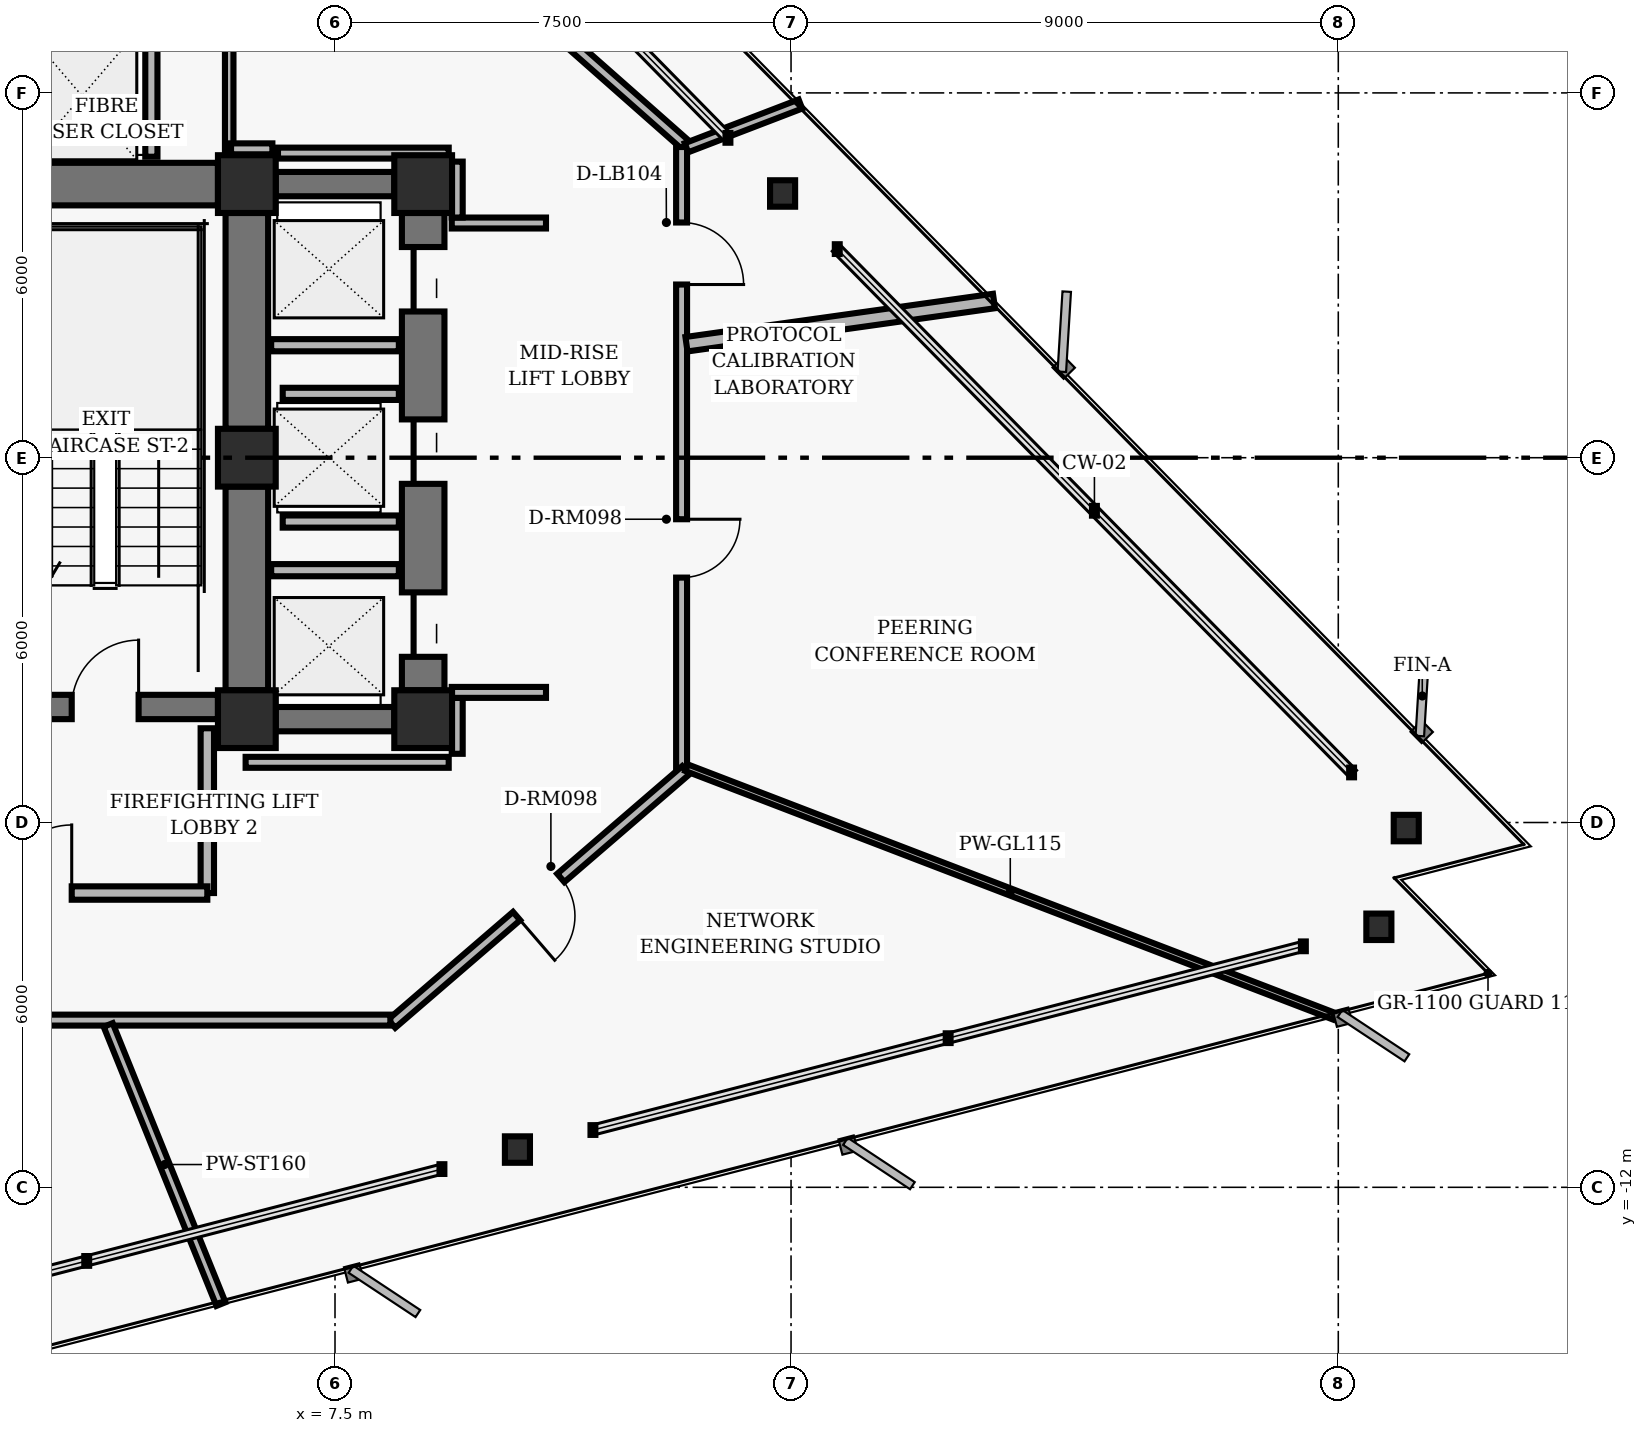
"""IFC4 building model, lengths in metres.
Left out: names, types, materials, properties, quantities, classifications, styles, units other than length and angle.
Written with IfcOpenShell. Run it as: python <this file> out.ifc"""

import sys

from ifc_helpers import new_model, si_unit, direction, frame, frame_2d, origin, origin_2d, place, context, subcontext, project, spatial, rectangle, hollow_rectangle, i_section, extrude, element, fill, save


model = new_model("IFC4")
c1 = context("Model", 3, precision=1e-05, world=origin(), true_north=direction((0.0, 1.0)))
c2 = subcontext(c1, "Body", "Model", "MODEL_VIEW")
j1 = project(units=[si_unit("LENGTHUNIT", "METRE"), si_unit("PLANEANGLEUNIT", "RADIAN")], contexts=[c1])
p1 = place(None, origin())
s1 = spatial("IfcSite", under=j1, at=p1, CompositionType="ELEMENT")
p2 = place(p1, origin())
s2 = spatial("IfcBuilding", under=s1, at=p2, CompositionType="ELEMENT")
p3 = place(p2, frame((0.0, 0.0, 97.76)))
s3 = spatial("IfcBuildingStorey", under=s2, at=p3, CompositionType="ELEMENT", Elevation=97.76)
for number, where, z_axis, x_axis in (
    (1, (6.05, 4.5, 0.0), (0.0, 0.0, 1.0), (1.0, 0.0, 0.0)),
    (2, (6.05, 0.0, 0.0), (0.0, 0.0, 1.0), (1.0, 0.0, 0.0)),
    (3, (6.05, -4.3, 0.0), (0.0, 0.0, 1.0), (1.0, 0.0, 0.0)),
    (4, (8.95, 4.5, 0.0), (0.0, 0.0, 1.0), (1.0, 0.0, 0.0)),
    (5, (8.95, -4.3, 0.0), (0.0, 0.0, 1.0), (1.0, 0.0, 0.0)),
):
    element("IfcColumn", number, at=place(p3, frame(where, z_axis=z_axis, x_axis=x_axis)), inside=s3, PredefinedType="COLUMN", context=c2, shape_type="SweptSolid", body=[
        extrude(hollow_rectangle(XDim=0.95, YDim=0.95, WallThickness=0.06, InnerFilletRadius=0.02, OuterFilletRadius=0.04, at=origin_2d()), origin(), (0.0, 0.0, 1.0), 3.04),
    ])
p4 = place(p3, frame((6.05, 0.475, 0.0), z_axis=(0.0, 0.0, 1.0), x_axis=(0.0, 1.0, 0.0)))
e6 = element("IfcWall", 6, at=p4, inside=s3, PredefinedType="SHEAR", context=c2, shape_type="SweptSolid", body=[
    extrude(rectangle(XDim=3.55, YDim=0.7, at=frame_2d((1.775, 0.0))), origin(), (0.0, 0.0, 1.0), 2.718),
])
p5 = place(p3, frame((6.05, -3.825, 0.0), z_axis=(0.0, 0.0, 1.0), x_axis=(0.0, 1.0, 0.0)))
e7 = element("IfcWall", 7, at=p5, inside=s3, PredefinedType="SHEAR", context=c2, shape_type="SweptSolid", body=[
    extrude(rectangle(XDim=3.35, YDim=0.7, at=frame_2d((1.675, 0.0))), origin(), (0.0, 0.0, 1.0), 2.718),
])
p6 = place(p3, frame((-5.575, -4.1, 0.0), z_axis=(0.0, 0.0, 1.0), x_axis=(1.0, 0.0, 0.0)))
e8 = element("IfcWall", 8, at=p6, inside=s3, PredefinedType="SHEAR", context=c2, shape_type="SweptSolid", body=[
    extrude(rectangle(XDim=11.15, YDim=0.4, at=frame_2d((5.575, 0.0))), origin(), (0.0, 0.0, 1.0), 2.718),
])
p7 = place(p6, frame((1.305, 0.0, 0.0)))
e9 = element("IfcOpeningElement", 9, at=p7, cuts=e8, PredefinedType="OPENING", context=c2, shape_type="SweptSolid", body=[
    extrude(rectangle(XDim=1.1, YDim=2.04, at=frame_2d((0.55, 1.02))), frame((0.0, 0.21, 0.0), z_axis=(0.0, -1.0, 0.0), x_axis=(1.0, 0.0, 0.0)), (0.0, 0.0, 1.0), 0.42),
])
p8 = place(p6, frame((8.745, 0.0, 0.0)))
e10 = element("IfcOpeningElement", 10, at=p8, cuts=e8, PredefinedType="OPENING", context=c2, shape_type="SweptSolid", body=[
    extrude(rectangle(XDim=1.1, YDim=2.04, at=frame_2d((0.55, 1.02))), frame((0.0, 0.21, 0.0), z_axis=(0.0, -1.0, 0.0), x_axis=(1.0, 0.0, 0.0)), (0.0, 0.0, 1.0), 0.42),
])
p9 = place(p6, frame((4.045, 0.0, 0.0)))
e11 = element("IfcOpeningElement", 11, at=p9, cuts=e8, PredefinedType="OPENING", context=c2, shape_type="SweptSolid", body=[
    extrude(rectangle(XDim=1.06, YDim=2.04, at=frame_2d((0.53, 1.02))), frame((0.0, 0.21, 0.0), z_axis=(0.0, -1.0, 0.0), x_axis=(1.0, 0.0, 0.0)), (0.0, 0.0, 1.0), 0.42),
])
p10 = place(p6, frame((6.045, 0.0, 0.0)))
e12 = element("IfcOpeningElement", 12, at=p10, cuts=e8, PredefinedType="OPENING", context=c2, shape_type="SweptSolid", body=[
    extrude(rectangle(XDim=1.06, YDim=2.04, at=frame_2d((0.53, 1.02))), frame((0.0, 0.21, 0.0), z_axis=(0.0, -1.0, 0.0), x_axis=(1.0, 0.0, 0.0)), (0.0, 0.0, 1.0), 0.42),
])
p11 = place(p3, frame((2.05, 4.5, 0.0), z_axis=(0.0, 0.0, 1.0), x_axis=(1.0, 0.0, 0.0)))
e13 = element("IfcWall", 13, at=p11, inside=s3, PredefinedType="SHEAR", context=c2, shape_type="SweptSolid", body=[
    extrude(rectangle(XDim=3.525, YDim=0.7, at=frame_2d((1.762, 0.0))), origin(), (0.0, 0.0, 1.0), 2.718),
])
p12 = place(p3, frame((8.95, -3.825, 0.0), z_axis=(0.0, 0.0, 1.0), x_axis=(0.0, 1.0, 0.0)))
e14 = element("IfcWall", 14, at=p12, inside=s3, PredefinedType="SHEAR", context=c2, shape_type="SweptSolid", body=[
    extrude(rectangle(XDim=7.85, YDim=0.7, at=frame_2d((3.925, 0.0))), origin(), (0.0, 0.0, 1.0), 2.718),
])
p13 = place(p12, frame((0.55, 0.0, 0.0)))
e15 = element("IfcOpeningElement", 15, at=p13, cuts=e14, PredefinedType="OPENING", context=c2, shape_type="SweptSolid", body=[
    extrude(rectangle(XDim=1.06, YDim=2.04, at=frame_2d((0.53, 1.02))), frame((0.0, 0.36, 0.0), z_axis=(0.0, -1.0, 0.0), x_axis=(1.0, 0.0, 0.0)), (0.0, 0.0, 1.0), 0.72),
])
p14 = place(p12, frame((3.395, 0.0, 0.0)))
e16 = element("IfcOpeningElement", 16, at=p14, cuts=e14, PredefinedType="OPENING", context=c2, shape_type="SweptSolid", body=[
    extrude(rectangle(XDim=1.06, YDim=2.04, at=frame_2d((0.53, 1.02))), frame((0.0, 0.36, 0.0), z_axis=(0.0, -1.0, 0.0), x_axis=(1.0, 0.0, 0.0)), (0.0, 0.0, 1.0), 0.72),
])
p15 = place(p12, frame((6.23, 0.0, 0.0)))
e17 = element("IfcOpeningElement", 17, at=p15, cuts=e14, PredefinedType="OPENING", context=c2, shape_type="SweptSolid", body=[
    extrude(rectangle(XDim=1.06, YDim=2.04, at=frame_2d((0.53, 1.02))), frame((0.0, 0.36, 0.0), z_axis=(0.0, -1.0, 0.0), x_axis=(1.0, 0.0, 0.0)), (0.0, 0.0, 1.0), 0.72),
])
for number, where, z_axis, x_axis in (
    (18, (6.525, 4.5, 0.0), (0.0, 0.0, 1.0), (1.0, 0.0, 0.0)),
    (19, (6.525, -4.3, 0.0), (0.0, 0.0, 1.0), (1.0, 0.0, 0.0)),
):
    element("IfcWall", number, at=place(p3, frame(where, z_axis=z_axis, x_axis=x_axis)), inside=s3, PredefinedType="SHEAR", context=c2, shape_type="SweptSolid", body=[
        extrude(rectangle(XDim=1.95, YDim=0.4, at=frame_2d((0.975, 0.0))), origin(), (0.0, 0.0, 1.0), 2.718),
    ])
for number, where, z_axis, x_axis in (
    (20, (25.118, -6.092, 0.0), (0.0, 0.0, 1.0), (1.0, 0.0, 0.0)),
    (21, (14.861, 4.346, 0.0), (0.0, 0.0, 1.0), (1.0, 0.0, 0.0)),
    (22, (10.5, -11.379, 0.0), (0.0, 0.0, 1.0), (1.0, 0.0, 0.0)),
    (23, (24.667, -7.715, 0.0), (0.0, 0.0, 1.0), (1.0, 0.0, 0.0)),
):
    element("IfcColumn", number, at=place(p3, frame(where, z_axis=z_axis, x_axis=x_axis)), inside=s3, PredefinedType="COLUMN", context=c2, shape_type="SweptSolid", body=[
        extrude(i_section(OverallWidth=0.412, OverallDepth=0.435, WebThickness=0.036, FlangeThickness=0.057, FilletRadius=0.022, at=origin_2d()), origin(), (0.0, 0.0, 1.0), 3.04),
    ])
p16 = place(p3, frame((5.4, -7.16, 0.0), z_axis=(0.0, 0.0, 1.0), x_axis=(0.0, 1.0, 0.0)))
e24 = element("IfcWall", 24, at=p16, inside=s3, PredefinedType="PARTITIONING", context=c2, shape_type="SweptSolid", body=[
    extrude(rectangle(XDim=2.71, YDim=0.22, at=frame_2d((1.355, 0.0))), origin(), (0.0, 0.0, 1.0), 2.693),
])
p17 = place(p3, frame((0.0, -7.16, 0.0), z_axis=(0.0, 0.0, 1.0), x_axis=(1.0, 0.0, 0.0)))
e25 = element("IfcWall", 25, at=p17, inside=s3, PredefinedType="PARTITIONING", context=c2, shape_type="SweptSolid", body=[
    extrude(rectangle(XDim=5.4, YDim=0.22, at=frame_2d((2.7, 0.0))), origin(), (0.0, 0.0, 1.0), 2.693),
])
p18 = place(p17, frame((2.05, 0.0, 0.0)))
e26 = element("IfcOpeningElement", 26, at=p18, cuts=e25, PredefinedType="OPENING", context=c2, shape_type="SweptSolid", body=[
    extrude(rectangle(XDim=1.12, YDim=2.02, at=frame_2d((0.56, 1.01))), frame((0.0, 0.12, 0.0), z_axis=(0.0, -1.0, 0.0), x_axis=(1.0, 0.0, 0.0)), (0.0, 0.0, 1.0), 0.24),
])
p19 = place(p3, frame((4.48, 4.95, 0.0), z_axis=(0.0, 0.0, 1.0), x_axis=(0.0, 1.0, 0.0)))
e27 = element("IfcWall", 27, at=p19, inside=s3, PredefinedType="PARTITIONING", context=c2, shape_type="SweptSolid", body=[
    extrude(rectangle(XDim=2.1, YDim=0.2, at=frame_2d((1.05, 0.0))), origin(), (0.0, 0.0, 1.0), 2.693),
])
p20 = place(p3, frame((5.76, 4.95, 0.0), z_axis=(0.0, 0.0, 1.0), x_axis=(0.0, 1.0, 0.0)))
e28 = element("IfcWall", 28, at=p20, inside=s3, PredefinedType="PARTITIONING", context=c2, shape_type="SweptSolid", body=[
    extrude(rectangle(XDim=2.1, YDim=0.14, at=frame_2d((1.05, 0.0))), origin(), (0.0, 0.0, 1.0), 2.693),
])
for number, where, z_axis, x_axis in (
    (29, (6.45, -1.85, 0.0), (0.0, 0.0, 1.0), (1.0, 0.0, 0.0)),
    (30, (6.45, 1.85, 0.0), (0.0, 0.0, 1.0), (1.0, 0.0, 0.0)),
):
    element("IfcWall", number, at=place(p3, frame(where, z_axis=z_axis, x_axis=x_axis)), inside=s3, PredefinedType="PARTITIONING", context=c2, shape_type="SweptSolid", body=[
        extrude(rectangle(XDim=2.1, YDim=0.2, at=frame_2d((1.05, 0.0))), origin(), (0.0, 0.0, 1.0), 2.693),
    ])
for number, where, z_axis, x_axis in (
    (31, (6.64, -1.05, 0.0), (0.0, 0.0, 1.0), (1.0, 0.0, 0.0)),
    (32, (6.64, 1.05, 0.0), (0.0, 0.0, 1.0), (1.0, 0.0, 0.0)),
):
    element("IfcWall", number, at=place(p3, frame(where, z_axis=z_axis, x_axis=x_axis)), inside=s3, PredefinedType="PARTITIONING", context=c2, shape_type="SweptSolid", body=[
        extrude(rectangle(XDim=1.91, YDim=0.2, at=frame_2d((0.955, 0.0))), origin(), (0.0, 0.0, 1.0), 2.693),
    ])
p21 = place(p3, frame((8.567, 9.29, 0.0), z_axis=(0.0, 0.0, 1.0), x_axis=(0.749626463267, -0.66186113768, 0.0)))
e33 = element("IfcWall", 33, at=p21, inside=s3, PredefinedType="PARTITIONING", context=c2, shape_type="SweptSolid", body=[
    extrude(rectangle(XDim=6.27, YDim=0.18, at=frame_2d((3.135, 0.0))), origin(), (0.0, 0.0, 1.0), 2.207),
])
p22 = place(p3, frame((13.2, 5.11, 0.0), z_axis=(0.0, 0.0, 1.0), x_axis=(0.0, -1.0, 0.0)))
e34 = element("IfcWall", 34, at=p22, inside=s3, PredefinedType="PARTITIONING", context=c2, shape_type="SweptSolid", body=[
    extrude(rectangle(XDim=10.22, YDim=0.18, at=frame_2d((5.11, 0.0))), origin(), (0.0, 0.0, 1.0), 2.207),
])
p23 = place(p22, frame((6.122, 0.0, 0.0)))
e35 = element("IfcOpeningElement", 35, at=p23, cuts=e34, PredefinedType="OPENING", context=c2, shape_type="SweptSolid", body=[
    extrude(rectangle(XDim=0.96, YDim=2.02, at=frame_2d((0.48, 1.01))), frame((0.0, 0.1, 0.0), z_axis=(0.0, -1.0, 0.0), x_axis=(1.0, 0.0, 0.0)), (0.0, 0.0, 1.0), 0.2),
])
p24 = place(p22, frame((1.242, 0.0, 0.0)))
e36 = element("IfcOpeningElement", 36, at=p24, cuts=e34, PredefinedType="OPENING", context=c2, shape_type="SweptSolid", body=[
    extrude(rectangle(XDim=1.02, YDim=2.02, at=frame_2d((0.51, 1.01))), frame((0.0, 0.1, 0.0), z_axis=(0.0, -1.0, 0.0), x_axis=(1.0, 0.0, 0.0)), (0.0, 0.0, 1.0), 0.2),
])
p25 = place(p3, frame((13.268, -5.141, 0.0), z_axis=(0.0, 0.0, 1.0), x_axis=(-0.757534501725, -0.65279512766, 0.0)))
e37 = element("IfcWall", 37, at=p25, inside=s3, PredefinedType="PARTITIONING", context=c2, shape_type="SweptSolid", body=[
    extrude(rectangle(XDim=6.385, YDim=0.18, at=frame_2d((3.192, 0.0))), origin(), (0.0, 0.0, 1.0), 2.693),
])
p26 = place(p25, frame((2.712, 0.0, 0.0)))
e38 = element("IfcOpeningElement", 38, at=p26, cuts=e37, PredefinedType="OPENING", context=c2, shape_type="SweptSolid", body=[
    extrude(rectangle(XDim=0.96, YDim=2.02, at=frame_2d((0.48, 1.01))), frame((0.0, 0.1, 0.0), z_axis=(0.0, -1.0, 0.0), x_axis=(1.0, 0.0, 0.0)), (0.0, 0.0, 1.0), 0.2),
])
p27 = place(p3, frame((8.41, -9.25, 0.0), z_axis=(0.0, 0.0, 1.0), x_axis=(-1.0, 0.0, 0.0)))
e39 = element("IfcWall", 39, at=p27, inside=s3, PredefinedType="PARTITIONING", context=c2, shape_type="SweptSolid", body=[
    extrude(rectangle(XDim=17.0, YDim=0.18, at=frame_2d((8.5, 0.0))), origin(), (0.0, 0.0, 1.0), 2.207),
])
p28 = place(p27, frame((10.181, 0.0, 0.0)))
e40 = element("IfcOpeningElement", 40, at=p28, cuts=e39, PredefinedType="OPENING", context=c2, shape_type="SweptSolid", body=[
    extrude(rectangle(XDim=1.02, YDim=2.02, at=frame_2d((0.51, 1.01))), frame((0.0, 0.1, 0.0), z_axis=(0.0, -1.0, 0.0), x_axis=(1.0, 0.0, 0.0)), (0.0, 0.0, 1.0), 0.2),
])
p29 = place(p3, frame((6.03, -5.01, 0.0), z_axis=(0.0, 0.0, 1.0), x_axis=(1.0, 0.0, 0.0)))
e41 = element("IfcWall", 41, at=p29, inside=s3, PredefinedType="PARTITIONING", context=c2, shape_type="SweptSolid", body=[
    extrude(rectangle(XDim=3.34, YDim=0.18, at=frame_2d((1.67, 0.0))), origin(), (0.0, 0.0, 1.0), 2.693),
])
p30 = place(p3, frame((9.51, -4.87, 0.0), z_axis=(0.0, 0.0, 1.0), x_axis=(0.0, 1.0, 0.0)))
e42 = element("IfcWall", 42, at=p30, inside=s3, PredefinedType="PARTITIONING", context=c2, shape_type="SweptSolid", body=[
    extrude(rectangle(XDim=0.92, YDim=0.18, at=frame_2d((0.46, 0.0))), origin(), (0.0, 0.0, 1.0), 1.978),
])
for number, where, z_axis, x_axis in (
    (43, (9.42, -3.86, 0.0), (0.0, 0.0, 1.0), (1.0, 0.0, 0.0)),
    (44, (10.97, 3.86, 0.0), (0.0, 0.0, 1.0), (-1.0, 0.0, 0.0)),
):
    element("IfcWall", number, at=place(p3, frame(where, z_axis=z_axis, x_axis=x_axis)), inside=s3, PredefinedType="PARTITIONING", context=c2, shape_type="SweptSolid", body=[
        extrude(rectangle(XDim=1.55, YDim=0.18, at=frame_2d((0.775, 0.0))), origin(), (0.0, 0.0, 1.0), 2.693),
    ])
p31 = place(p3, frame((9.51, 3.95, 0.0), z_axis=(0.0, 0.0, 1.0), x_axis=(0.0, 1.0, 0.0)))
e45 = element("IfcWall", 45, at=p31, inside=s3, PredefinedType="PARTITIONING", context=c2, shape_type="SweptSolid", body=[
    extrude(rectangle(XDim=0.92, YDim=0.18, at=frame_2d((0.46, 0.0))), origin(), (0.0, 0.0, 1.0), 2.693),
])
p32 = place(p3, frame((9.37, 5.01, 0.0), z_axis=(0.0, 0.0, 1.0), x_axis=(-1.0, 0.0, 0.0)))
e46 = element("IfcWall", 46, at=p32, inside=s3, PredefinedType="PARTITIONING", context=c2, shape_type="SweptSolid", body=[
    extrude(rectangle(XDim=2.808, YDim=0.18, at=frame_2d((1.404, 0.0))), origin(), (0.0, 0.0, 1.0), 2.693),
])
p33 = place(p3, frame((6.47, 5.08, 0.0), z_axis=(0.0, 0.0, 1.0), x_axis=(-1.0, 0.0, 0.0)))
e47 = element("IfcWall", 47, at=p33, inside=s3, PredefinedType="PARTITIONING", context=c2, shape_type="SweptSolid", body=[
    extrude(rectangle(XDim=0.68, YDim=0.18, at=frame_2d((0.34, 0.0))), origin(), (0.0, 0.0, 1.0), 2.693),
])
p34 = place(p3, frame((3.77, -9.33, 0.0), z_axis=(0.0, 0.0, 1.0), x_axis=(0.374635876877, -0.927172022743, 0.0)))
e48 = element("IfcWall", 48, at=p34, inside=s3, PredefinedType="PARTITIONING", context=c2, shape_type="SweptSolid", body=[
    extrude(rectangle(XDim=4.951, YDim=0.16, at=frame_2d((2.476, 0.0))), origin(), (0.0, 0.0, 1.0), 2.693),
])
p35 = place(p3, frame((13.28, -5.098, 0.0), z_axis=(0.0, 0.0, 1.0), x_axis=(0.933579254187, -0.358371003504, 0.0)))
e49 = element("IfcWall", 49, at=p35, inside=s3, PredefinedType="MOVABLE", context=c2, shape_type="SweptSolid", body=[
    extrude(rectangle(XDim=11.409, YDim=0.115, at=frame_2d((5.705, 0.0))), origin(), (0.0, 0.0, 1.0), 1.978),
])
p36 = place(p3, frame((13.28, 1.866, 0.0), z_axis=(0.0, 0.0, 1.0), x_axis=(0.990270993163, 0.139152291036, 0.0)))
e50 = element("IfcWall", 50, at=p36, inside=s3, PredefinedType="PARTITIONING", context=c2, shape_type="SweptSolid", body=[
    extrude(rectangle(XDim=5.107, YDim=0.24, at=frame_2d((2.554, 0.0))), origin(), (0.0, 0.0, 1.0), 2.693),
])
p37 = place(p3, frame((13.28, 5.098, 0.0), z_axis=(0.0, 0.0, 1.0), x_axis=(0.933586794089, 0.358351360962, 0.0)))
e51 = element("IfcWall", 51, at=p37, inside=s3, PredefinedType="PARTITIONING", context=c2, shape_type="SweptSolid", body=[
    extrude(rectangle(XDim=2.007, YDim=0.16, at=frame_2d((1.003, 0.0))), origin(), (0.0, 0.0, 1.0), 2.693),
])
p38 = place(p8, origin())
e52 = element("IfcDoor", 52, at=p38, inside=s3, OperationType="SINGLE_SWING_RIGHT", PredefinedType="DOOR", context=c2, shape_type="SweptSolid", body=[
    extrude(rectangle(XDim=1.1, YDim=2.04, at=frame_2d((0.55, 1.02))), frame((0.0, 0.025, 0.0), z_axis=(0.0, -1.0, 0.0), x_axis=(1.0, 0.0, 0.0)), (0.0, 0.0, 1.0), 0.05),
])
fill(e10, e52)
p39 = place(p18, origin())
e53 = element("IfcDoor", 53, at=p39, inside=s3, OperationType="SINGLE_SWING_RIGHT", PredefinedType="DOOR", context=c2, shape_type="SweptSolid", body=[
    extrude(rectangle(XDim=1.12, YDim=2.02, at=frame_2d((0.56, 1.01))), frame((0.0, 0.025, 0.0), z_axis=(0.0, -1.0, 0.0), x_axis=(1.0, 0.0, 0.0)), (0.0, 0.0, 1.0), 0.05),
])
fill(e26, e53)
p40 = place(p13, origin())
e54 = element("IfcDoor", 54, at=p40, inside=s3, OperationType="SLIDING_TO_LEFT", PredefinedType="DOOR", context=c2, shape_type="SweptSolid", body=[
    extrude(rectangle(XDim=1.06, YDim=2.04, at=frame_2d((0.53, 1.02))), frame((0.0, 0.025, 0.0), z_axis=(0.0, -1.0, 0.0), x_axis=(1.0, 0.0, 0.0)), (0.0, 0.0, 1.0), 0.05),
])
fill(e15, e54)
p41 = place(p14, origin())
e55 = element("IfcDoor", 55, at=p41, inside=s3, OperationType="SLIDING_TO_RIGHT", PredefinedType="DOOR", context=c2, shape_type="SweptSolid", body=[
    extrude(rectangle(XDim=1.06, YDim=2.04, at=frame_2d((0.53, 1.02))), frame((0.0, 0.025, 0.0), z_axis=(0.0, -1.0, 0.0), x_axis=(1.0, 0.0, 0.0)), (0.0, 0.0, 1.0), 0.05),
])
fill(e16, e55)
p42 = place(p15, origin())
e56 = element("IfcDoor", 56, at=p42, inside=s3, OperationType="SLIDING_TO_LEFT", PredefinedType="DOOR", context=c2, shape_type="SweptSolid", body=[
    extrude(rectangle(XDim=1.06, YDim=2.04, at=frame_2d((0.53, 1.02))), frame((0.0, 0.025, 0.0), z_axis=(0.0, -1.0, 0.0), x_axis=(1.0, 0.0, 0.0)), (0.0, 0.0, 1.0), 0.05),
])
fill(e17, e56)
p43 = place(p26, origin())
e57 = element("IfcDoor", 57, at=p43, inside=s3, OperationType="SINGLE_SWING_RIGHT", PredefinedType="DOOR", context=c2, shape_type="SweptSolid", body=[
    extrude(rectangle(XDim=0.96, YDim=2.02, at=frame_2d((0.48, 1.01))), frame((0.0, 0.025, 0.0), z_axis=(0.0, -1.0, 0.0), x_axis=(1.0, 0.0, 0.0)), (0.0, 0.0, 1.0), 0.05),
])
fill(e38, e57)
p44 = place(p23, origin())
e58 = element("IfcDoor", 58, at=p44, inside=s3, OperationType="SINGLE_SWING_LEFT", PredefinedType="DOOR", context=c2, shape_type="SweptSolid", body=[
    extrude(rectangle(XDim=0.96, YDim=2.02, at=frame_2d((0.48, 1.01))), frame((0.0, 0.025, 0.0), z_axis=(0.0, -1.0, 0.0), x_axis=(1.0, 0.0, 0.0)), (0.0, 0.0, 1.0), 0.05),
])
fill(e35, e58)
p45 = place(p24, origin())
e59 = element("IfcDoor", 59, at=p45, inside=s3, OperationType="SINGLE_SWING_RIGHT", PredefinedType="DOOR", context=c2, shape_type="SweptSolid", body=[
    extrude(rectangle(XDim=1.02, YDim=2.02, at=frame_2d((0.51, 1.01))), frame((0.0, 0.025, 0.0), z_axis=(0.0, -1.0, 0.0), x_axis=(1.0, 0.0, 0.0)), (0.0, 0.0, 1.0), 0.05),
])
fill(e36, e59)
save(model, sys.argv[1])
